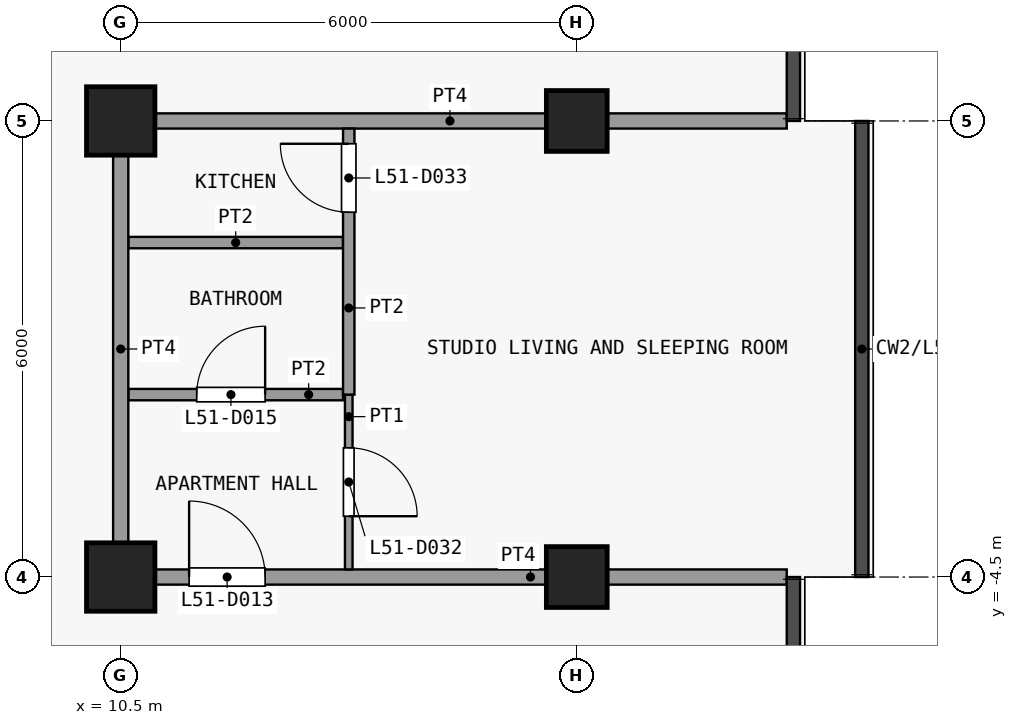
"""IFC4 building model, lengths in metres.
Left out: names, types, materials, properties, quantities, classifications, styles, units other than length and angle.
Written with IfcOpenShell. Run it as: python <this file> out.ifc"""

import sys

from ifc_helpers import new_model, si_unit, direction, frame, frame_2d, origin, origin_2d, place, context, subcontext, project, spatial, rectangle, extrude, element, fill, save


model = new_model("IFC4")
c1 = context("Model", 3, precision=1e-05, world=origin(), true_north=direction((0.0, 1.0)))
c2 = subcontext(c1, "Body", "Model", "MODEL_VIEW")
j1 = project(units=[si_unit("LENGTHUNIT", "METRE"), si_unit("PLANEANGLEUNIT", "RADIAN")], contexts=[c1])
p1 = place(None, origin())
s1 = spatial("IfcSite", under=j1, at=p1, CompositionType="ELEMENT")
p2 = place(p1, origin())
s2 = spatial("IfcBuilding", under=s1, at=p2, CompositionType="ELEMENT")
p3 = place(p2, frame((0.0, 0.0, 205.1)))
s3 = spatial("IfcBuildingStorey", under=s2, at=p3, CompositionType="ELEMENT", Elevation=205.1)
for number, where, z_axis, x_axis in (
    (1, (10.5, -4.5, 0.0), (0.0, 0.0, 1.0), (1.0, 0.0, 0.0)),
    (2, (10.5, 1.5, 0.0), (0.0, 0.0, 1.0), (1.0, 0.0, 0.0)),
):
    element("IfcColumn", number, at=place(p3, frame(where, z_axis=z_axis, x_axis=x_axis)), inside=s3, PredefinedType="COLUMN", context=c2, shape_type="SweptSolid", body=[
        extrude(rectangle(XDim=0.9, YDim=0.9, at=origin_2d()), origin(), (0.0, 0.0, 1.0), 3.6),
    ])
for number, where, z_axis, x_axis in (
    (3, (16.5, -4.5, 0.0), (0.0, 0.0, 1.0), (1.0, 0.0, 0.0)),
    (4, (16.5, 1.5, 0.0), (0.0, 0.0, 1.0), (1.0, 0.0, 0.0)),
):
    element("IfcColumn", number, at=place(p3, frame(where, z_axis=z_axis, x_axis=x_axis)), inside=s3, PredefinedType="COLUMN", context=c2, shape_type="SweptSolid", body=[
        extrude(rectangle(XDim=0.8, YDim=0.8, at=origin_2d()), origin(), (0.0, 0.0, 1.0), 3.6),
    ])
p4 = place(p3, frame((10.4, -4.5, 0.0), z_axis=(0.0, 0.0, 1.0), x_axis=(1.0, 0.0, 0.0)))
e5 = element("IfcWall", 5, at=p4, inside=s3, PredefinedType="PARTITIONING", context=c2, shape_type="SweptSolid", body=[
    extrude(rectangle(XDim=8.863, YDim=0.2, at=frame_2d((4.431, 0.0))), origin(), (0.0, 0.0, 1.0), 3.3),
])
p5 = place(p4, frame((1.0, 0.0, 0.0)))
e6 = element("IfcOpeningElement", 6, at=p5, cuts=e5, PredefinedType="OPENING", context=c2, shape_type="SweptSolid", body=[
    extrude(rectangle(XDim=1.0, YDim=2.1, at=frame_2d((0.5, 1.05))), frame((0.0, 0.11, 0.0), z_axis=(0.0, -1.0, 0.0), x_axis=(1.0, 0.0, 0.0)), (0.0, 0.0, 1.0), 0.22),
])
p6 = place(p3, frame((10.6, -2.1, 0.0), z_axis=(0.0, 0.0, 1.0), x_axis=(1.0, 0.0, 0.0)))
e7 = element("IfcWall", 7, at=p6, inside=s3, PredefinedType="PARTITIONING", context=c2, shape_type="SweptSolid", body=[
    extrude(rectangle(XDim=2.825, YDim=0.15, at=frame_2d((1.413, 0.0))), origin(), (0.0, 0.0, 1.0), 3.3),
])
p7 = place(p6, frame((0.9, 0.0, 0.0)))
e8 = element("IfcOpeningElement", 8, at=p7, cuts=e7, PredefinedType="OPENING", context=c2, shape_type="SweptSolid", body=[
    extrude(rectangle(XDim=0.9, YDim=2.1, at=frame_2d((0.45, 1.05))), frame((0.0, 0.085, 0.0), z_axis=(0.0, -1.0, 0.0), x_axis=(1.0, 0.0, 0.0)), (0.0, 0.0, 1.0), 0.17),
])
p8 = place(p3, frame((10.6, -0.1, 0.0), z_axis=(0.0, 0.0, 1.0), x_axis=(1.0, 0.0, 0.0)))
e9 = element("IfcWall", 9, at=p8, inside=s3, PredefinedType="PARTITIONING", context=c2, shape_type="SweptSolid", body=[
    extrude(rectangle(XDim=2.825, YDim=0.15, at=frame_2d((1.413, 0.0))), origin(), (0.0, 0.0, 1.0), 3.3),
])
p9 = place(p3, frame((10.4, 1.5, 0.0), z_axis=(0.0, 0.0, 1.0), x_axis=(1.0, 0.0, 0.0)))
e10 = element("IfcWall", 10, at=p9, inside=s3, PredefinedType="PARTITIONING", context=c2, shape_type="SweptSolid", body=[
    extrude(rectangle(XDim=8.863, YDim=0.2, at=frame_2d((4.431, 0.0))), origin(), (0.0, 0.0, 1.0), 3.3),
])
p10 = place(p3, frame((10.5, -4.4, 0.0), z_axis=(0.0, 0.0, 1.0), x_axis=(0.0, 1.0, 0.0)))
e11 = element("IfcWall", 11, at=p10, inside=s3, PredefinedType="PARTITIONING", context=c2, shape_type="SweptSolid", body=[
    extrude(rectangle(XDim=5.8, YDim=0.2, at=frame_2d((2.9, 0.0))), origin(), (0.0, 0.0, 1.0), 3.3),
])
p11 = place(p3, frame((13.5, -4.4, 0.0), z_axis=(0.0, 0.0, 1.0), x_axis=(0.0, 1.0, 0.0)))
e12 = element("IfcWall", 12, at=p11, inside=s3, PredefinedType="PARTITIONING", context=c2, shape_type="SweptSolid", body=[
    extrude(rectangle(XDim=2.3, YDim=0.1, at=frame_2d((1.15, 0.0))), origin(), (0.0, 0.0, 1.0), 3.3),
])
p12 = place(p11, frame((0.7, 0.0, 0.0)))
e13 = element("IfcOpeningElement", 13, at=p12, cuts=e12, PredefinedType="OPENING", context=c2, shape_type="SweptSolid", body=[
    extrude(rectangle(XDim=0.9, YDim=2.1, at=frame_2d((0.45, 1.05))), frame((0.0, 0.06, 0.0), z_axis=(0.0, -1.0, 0.0), x_axis=(1.0, 0.0, 0.0)), (0.0, 0.0, 1.0), 0.12),
])
p13 = place(p3, frame((13.5, -2.1, 0.0), z_axis=(0.0, 0.0, 1.0), x_axis=(0.0, 1.0, 0.0)))
e14 = element("IfcWall", 14, at=p13, inside=s3, PredefinedType="PARTITIONING", context=c2, shape_type="SweptSolid", body=[
    extrude(rectangle(XDim=3.5, YDim=0.15, at=frame_2d((1.75, 0.0))), origin(), (0.0, 0.0, 1.0), 3.3),
])
p14 = place(p13, frame((2.4, 0.0, 0.0)))
e15 = element("IfcOpeningElement", 15, at=p14, cuts=e14, PredefinedType="OPENING", context=c2, shape_type="SweptSolid", body=[
    extrude(rectangle(XDim=0.9, YDim=2.1, at=frame_2d((0.45, 1.05))), frame((0.0, 0.085, 0.0), z_axis=(0.0, -1.0, 0.0), x_axis=(1.0, 0.0, 0.0)), (0.0, 0.0, 1.0), 0.17),
])
p15 = place(p5, origin())
e16 = element("IfcDoor", 16, at=p15, inside=s3, OperationType="SINGLE_SWING_RIGHT", PredefinedType="DOOR", context=c2, shape_type="SweptSolid", body=[
    extrude(rectangle(XDim=1.0, YDim=2.1, at=frame_2d((0.5, 1.05))), frame((0.0, 0.025, 0.0), z_axis=(0.0, -1.0, 0.0), x_axis=(1.0, 0.0, 0.0)), (0.0, 0.0, 1.0), 0.05),
])
fill(e6, e16)
p16 = place(p7, origin())
e17 = element("IfcDoor", 17, at=p16, inside=s3, OperationType="SINGLE_SWING_LEFT", PredefinedType="DOOR", context=c2, shape_type="SweptSolid", body=[
    extrude(rectangle(XDim=0.9, YDim=2.1, at=frame_2d((0.45, 1.05))), frame((0.0, 0.025, 0.0), z_axis=(0.0, -1.0, 0.0), x_axis=(1.0, 0.0, 0.0)), (0.0, 0.0, 1.0), 0.05),
])
fill(e8, e17)
p17 = place(p12, origin())
e18 = element("IfcDoor", 18, at=p17, inside=s3, OperationType="SINGLE_SWING_LEFT", PredefinedType="DOOR", context=c2, shape_type="SweptSolid", body=[
    extrude(rectangle(XDim=0.9, YDim=2.1, at=frame_2d((0.45, 1.05))), frame((0.0, 0.025, 0.0), z_axis=(0.0, -1.0, 0.0), x_axis=(1.0, 0.0, 0.0)), (0.0, 0.0, 1.0), 0.05),
])
fill(e13, e18)
p18 = place(p14, origin())
e19 = element("IfcDoor", 19, at=p18, inside=s3, OperationType="SINGLE_SWING_LEFT", PredefinedType="DOOR", context=c2, shape_type="SweptSolid", body=[
    extrude(rectangle(XDim=0.9, YDim=2.1, at=frame_2d((0.45, 1.05))), frame((0.0, 0.025, 0.0), z_axis=(0.0, -1.0, 0.0), x_axis=(1.0, 0.0, 0.0)), (0.0, 0.0, 1.0), 0.05),
])
fill(e15, e19)
save(model, sys.argv[1])
